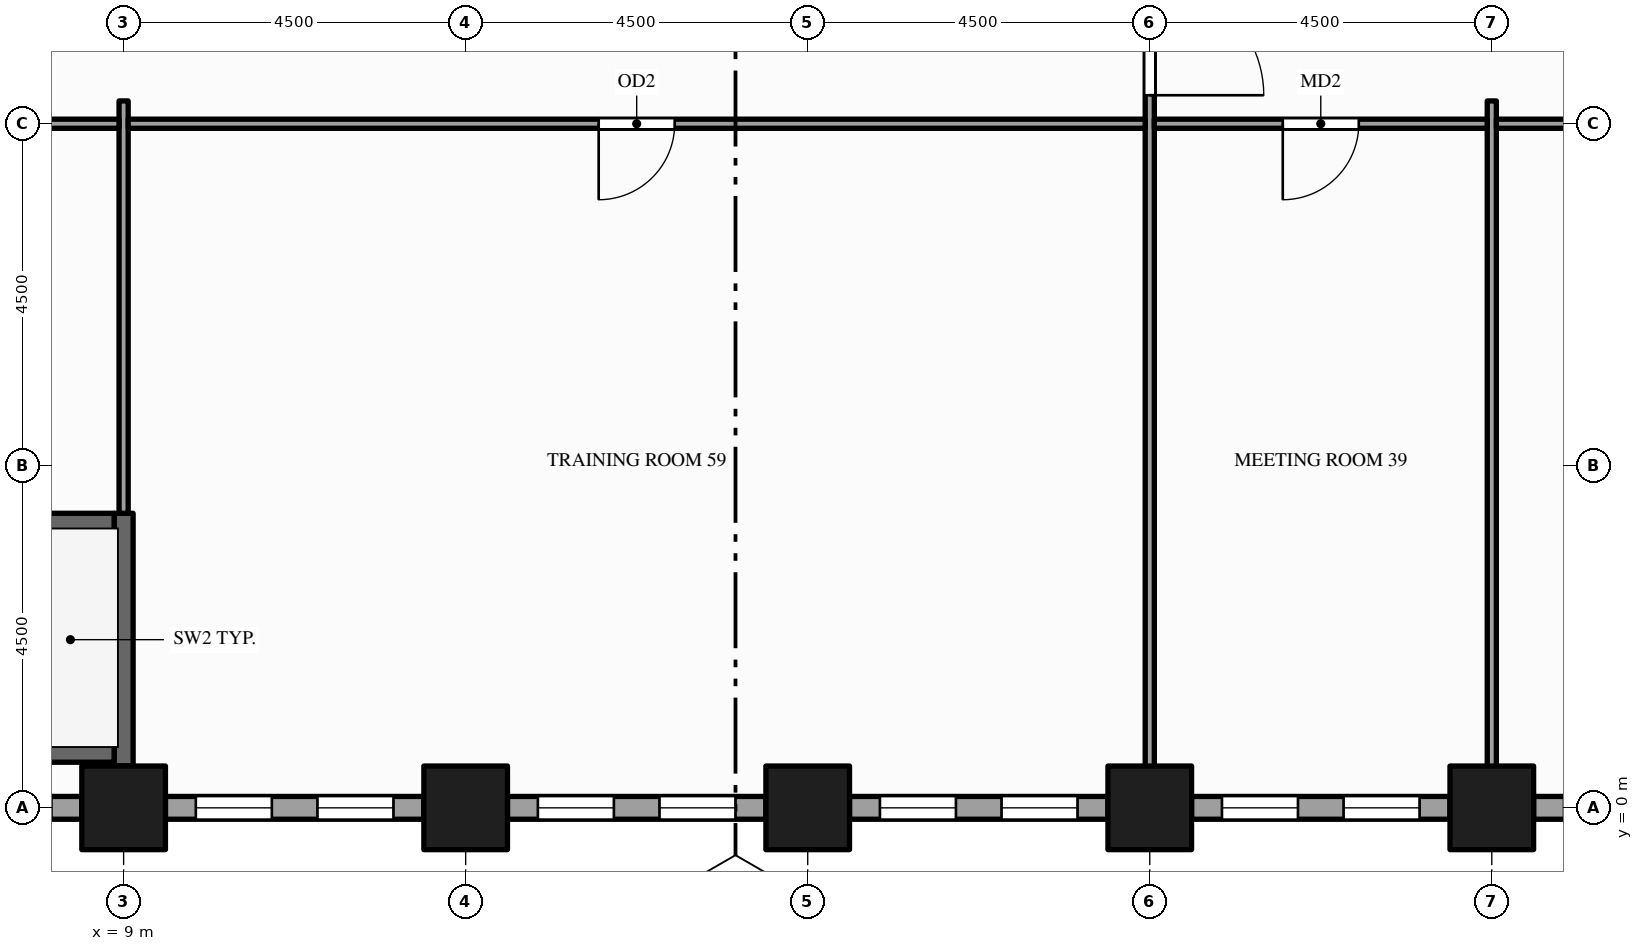
"""IFC4 building model, lengths in metres.
Left out: names, types, materials, properties, quantities, classifications, styles, units other than length and angle.
Written with IfcOpenShell. Run it as: python <this file> out.ifc"""

import sys

from ifc_helpers import new_model, si_unit, direction, frame, frame_2d, origin, origin_2d, place, context, subcontext, project, spatial, rectangle, hollow_rectangle, extrude, element, fill, save


model = new_model("IFC4")
c1 = context("Model", 3, precision=1e-05, world=origin(), true_north=direction((0.0, 1.0)))
c2 = subcontext(c1, "Body", "Model", "MODEL_VIEW")
j1 = project(units=[si_unit("LENGTHUNIT", "METRE"), si_unit("PLANEANGLEUNIT", "RADIAN")], contexts=[c1])
p1 = place(None, origin())
s1 = spatial("IfcSite", under=j1, at=p1, CompositionType="ELEMENT")
p2 = place(p1, origin())
s2 = spatial("IfcBuilding", under=s1, at=p2, CompositionType="ELEMENT")
p3 = place(p2, frame((0.0, 0.0, 14.0)))
s3 = spatial("IfcBuildingStorey", under=s2, at=p3, CompositionType="ELEMENT", Elevation=14.0)
for number, where, z_axis, x_axis in (
    (1, (9.0, 0.0, -0.25), (0.0, 0.0, 1.0), (1.0, 0.0, 0.0)),
    (2, (13.5, 0.0, -0.25), (0.0, 0.0, 1.0), (1.0, 0.0, 0.0)),
    (3, (18.0, 0.0, -0.25), (0.0, 0.0, 1.0), (1.0, 0.0, 0.0)),
    (4, (22.5, 0.0, -0.25), (0.0, 0.0, 1.0), (1.0, 0.0, 0.0)),
    (5, (27.0, 0.0, -0.25), (0.0, 0.0, 1.0), (1.0, 0.0, 0.0)),
):
    element("IfcColumn", number, at=place(p3, frame(where, z_axis=z_axis, x_axis=x_axis)), inside=s3, PredefinedType="COLUMN", context=c2, shape_type="SweptSolid", body=[
        extrude(hollow_rectangle(XDim=1.1, YDim=1.1, WallThickness=0.06, at=origin_2d()), origin(), (0.0, 0.0, 1.0), 5.0),
    ])
p4 = place(p3, frame((5.05, 0.0, 0.0), z_axis=(0.0, 0.0, 1.0), x_axis=(1.0, 0.0, 0.0)))
e6 = element("IfcWall", 6, at=p4, inside=s3, PredefinedType="STANDARD", context=c2, shape_type="SweptSolid", body=[
    extrude(rectangle(XDim=3.4, YDim=0.3, at=frame_2d((1.7, 0.0))), origin(), (0.0, 0.0, 1.0), 4.036),
])
p5 = place(p4, frame((0.4, 0.0, 0.9)))
e7 = element("IfcOpeningElement", 7, at=p5, cuts=e6, PredefinedType="OPENING", context=c2, shape_type="SweptSolid", body=[
    extrude(rectangle(XDim=1.0, YDim=2.75, at=frame_2d((0.5, 1.375))), frame((0.0, 0.16, 0.0), z_axis=(0.0, -1.0, 0.0), x_axis=(1.0, 0.0, 0.0)), (0.0, 0.0, 1.0), 0.32),
])
p6 = place(p4, frame((2.0, 0.0, 0.9)))
e8 = element("IfcOpeningElement", 8, at=p6, cuts=e6, PredefinedType="OPENING", context=c2, shape_type="SweptSolid", body=[
    extrude(rectangle(XDim=1.0, YDim=2.75, at=frame_2d((0.5, 1.375))), frame((0.0, 0.16, 0.0), z_axis=(0.0, -1.0, 0.0), x_axis=(1.0, 0.0, 0.0)), (0.0, 0.0, 1.0), 0.32),
])
p7 = place(p3, frame((9.55, 0.0, 0.0), z_axis=(0.0, 0.0, 1.0), x_axis=(1.0, 0.0, 0.0)))
e9 = element("IfcWall", 9, at=p7, inside=s3, PredefinedType="STANDARD", context=c2, shape_type="SweptSolid", body=[
    extrude(rectangle(XDim=3.4, YDim=0.3, at=frame_2d((1.7, 0.0))), origin(), (0.0, 0.0, 1.0), 4.036),
])
p8 = place(p7, frame((0.4, 0.0, 0.9)))
e10 = element("IfcOpeningElement", 10, at=p8, cuts=e9, PredefinedType="OPENING", context=c2, shape_type="SweptSolid", body=[
    extrude(rectangle(XDim=1.0, YDim=2.75, at=frame_2d((0.5, 1.375))), frame((0.0, 0.16, 0.0), z_axis=(0.0, -1.0, 0.0), x_axis=(1.0, 0.0, 0.0)), (0.0, 0.0, 1.0), 0.32),
])
p9 = place(p7, frame((2.0, 0.0, 0.9)))
e11 = element("IfcOpeningElement", 11, at=p9, cuts=e9, PredefinedType="OPENING", context=c2, shape_type="SweptSolid", body=[
    extrude(rectangle(XDim=1.0, YDim=2.75, at=frame_2d((0.5, 1.375))), frame((0.0, 0.16, 0.0), z_axis=(0.0, -1.0, 0.0), x_axis=(1.0, 0.0, 0.0)), (0.0, 0.0, 1.0), 0.32),
])
p10 = place(p3, frame((14.05, 0.0, 0.0), z_axis=(0.0, 0.0, 1.0), x_axis=(1.0, 0.0, 0.0)))
e12 = element("IfcWall", 12, at=p10, inside=s3, PredefinedType="STANDARD", context=c2, shape_type="SweptSolid", body=[
    extrude(rectangle(XDim=3.4, YDim=0.3, at=frame_2d((1.7, 0.0))), origin(), (0.0, 0.0, 1.0), 4.036),
])
p11 = place(p10, frame((0.4, 0.0, 0.9)))
e13 = element("IfcOpeningElement", 13, at=p11, cuts=e12, PredefinedType="OPENING", context=c2, shape_type="SweptSolid", body=[
    extrude(rectangle(XDim=1.0, YDim=2.75, at=frame_2d((0.5, 1.375))), frame((0.0, 0.16, 0.0), z_axis=(0.0, -1.0, 0.0), x_axis=(1.0, 0.0, 0.0)), (0.0, 0.0, 1.0), 0.32),
])
p12 = place(p10, frame((2.0, 0.0, 0.9)))
e14 = element("IfcOpeningElement", 14, at=p12, cuts=e12, PredefinedType="OPENING", context=c2, shape_type="SweptSolid", body=[
    extrude(rectangle(XDim=1.0, YDim=2.75, at=frame_2d((0.5, 1.375))), frame((0.0, 0.16, 0.0), z_axis=(0.0, -1.0, 0.0), x_axis=(1.0, 0.0, 0.0)), (0.0, 0.0, 1.0), 0.32),
])
p13 = place(p3, frame((18.55, 0.0, 0.0), z_axis=(0.0, 0.0, 1.0), x_axis=(1.0, 0.0, 0.0)))
e15 = element("IfcWall", 15, at=p13, inside=s3, PredefinedType="STANDARD", context=c2, shape_type="SweptSolid", body=[
    extrude(rectangle(XDim=3.4, YDim=0.3, at=frame_2d((1.7, 0.0))), origin(), (0.0, 0.0, 1.0), 4.036),
])
p14 = place(p13, frame((0.4, 0.0, 0.9)))
e16 = element("IfcOpeningElement", 16, at=p14, cuts=e15, PredefinedType="OPENING", context=c2, shape_type="SweptSolid", body=[
    extrude(rectangle(XDim=1.0, YDim=2.75, at=frame_2d((0.5, 1.375))), frame((0.0, 0.16, 0.0), z_axis=(0.0, -1.0, 0.0), x_axis=(1.0, 0.0, 0.0)), (0.0, 0.0, 1.0), 0.32),
])
p15 = place(p13, frame((2.0, 0.0, 0.9)))
e17 = element("IfcOpeningElement", 17, at=p15, cuts=e15, PredefinedType="OPENING", context=c2, shape_type="SweptSolid", body=[
    extrude(rectangle(XDim=1.0, YDim=2.75, at=frame_2d((0.5, 1.375))), frame((0.0, 0.16, 0.0), z_axis=(0.0, -1.0, 0.0), x_axis=(1.0, 0.0, 0.0)), (0.0, 0.0, 1.0), 0.32),
])
p16 = place(p3, frame((23.05, 0.0, 0.0), z_axis=(0.0, 0.0, 1.0), x_axis=(1.0, 0.0, 0.0)))
e18 = element("IfcWall", 18, at=p16, inside=s3, PredefinedType="STANDARD", context=c2, shape_type="SweptSolid", body=[
    extrude(rectangle(XDim=3.4, YDim=0.3, at=frame_2d((1.7, 0.0))), origin(), (0.0, 0.0, 1.0), 4.036),
])
p17 = place(p16, frame((0.4, 0.0, 0.9)))
e19 = element("IfcOpeningElement", 19, at=p17, cuts=e18, PredefinedType="OPENING", context=c2, shape_type="SweptSolid", body=[
    extrude(rectangle(XDim=1.0, YDim=2.75, at=frame_2d((0.5, 1.375))), frame((0.0, 0.16, 0.0), z_axis=(0.0, -1.0, 0.0), x_axis=(1.0, 0.0, 0.0)), (0.0, 0.0, 1.0), 0.32),
])
p18 = place(p16, frame((2.0, 0.0, 0.9)))
e20 = element("IfcOpeningElement", 20, at=p18, cuts=e18, PredefinedType="OPENING", context=c2, shape_type="SweptSolid", body=[
    extrude(rectangle(XDim=1.0, YDim=2.75, at=frame_2d((0.5, 1.375))), frame((0.0, 0.16, 0.0), z_axis=(0.0, -1.0, 0.0), x_axis=(1.0, 0.0, 0.0)), (0.0, 0.0, 1.0), 0.32),
])
p19 = place(p3, frame((27.55, 0.0, 0.0), z_axis=(0.0, 0.0, 1.0), x_axis=(1.0, 0.0, 0.0)))
e21 = element("IfcWall", 21, at=p19, inside=s3, PredefinedType="STANDARD", context=c2, shape_type="SweptSolid", body=[
    extrude(rectangle(XDim=3.4, YDim=0.3, at=frame_2d((1.7, 0.0))), origin(), (0.0, 0.0, 1.0), 4.036),
])
p20 = place(p19, frame((0.4, 0.0, 0.9)))
e22 = element("IfcOpeningElement", 22, at=p20, cuts=e21, PredefinedType="OPENING", context=c2, shape_type="SweptSolid", body=[
    extrude(rectangle(XDim=1.0, YDim=2.75, at=frame_2d((0.5, 1.375))), frame((0.0, 0.16, 0.0), z_axis=(0.0, -1.0, 0.0), x_axis=(1.0, 0.0, 0.0)), (0.0, 0.0, 1.0), 0.32),
])
p21 = place(p19, frame((2.0, 0.0, 0.9)))
e23 = element("IfcOpeningElement", 23, at=p21, cuts=e21, PredefinedType="OPENING", context=c2, shape_type="SweptSolid", body=[
    extrude(rectangle(XDim=1.0, YDim=2.75, at=frame_2d((0.5, 1.375))), frame((0.0, 0.16, 0.0), z_axis=(0.0, -1.0, 0.0), x_axis=(1.0, 0.0, 0.0)), (0.0, 0.0, 1.0), 0.32),
])
p22 = place(p3, frame((9.0, 0.15, 0.0), z_axis=(0.0, 0.0, 1.0), x_axis=(0.0, 1.0, 0.0)))
e24 = element("IfcWall", 24, at=p22, inside=s3, PredefinedType="PARTITIONING", context=c2, shape_type="SweptSolid", body=[
    extrude(rectangle(XDim=0.4, YDim=0.12, at=frame_2d((0.2, 0.0))), origin(), (0.0, 0.0, 1.0), 4.75),
])
p23 = place(p3, frame((9.0, 0.55, 0.0), z_axis=(0.0, 0.0, 1.0), x_axis=(0.0, 1.0, 0.0)))
e25 = element("IfcWall", 25, at=p23, inside=s3, PredefinedType="SHEAR", context=c2, shape_type="SweptSolid", body=[
    extrude(rectangle(XDim=3.325, YDim=0.25, at=frame_2d((1.663, 0.0))), origin(), (0.0, 0.0, 1.0), 4.75),
])
p24 = place(p3, frame((9.0, 3.875, 0.0), z_axis=(0.0, 0.0, 1.0), x_axis=(0.0, 1.0, 0.0)))
e26 = element("IfcWall", 26, at=p24, inside=s3, PredefinedType="PARTITIONING", context=c2, shape_type="SweptSolid", body=[
    extrude(rectangle(XDim=5.425, YDim=0.12, at=frame_2d((2.712, 0.0))), origin(), (0.0, 0.0, 1.0), 3.759),
])
p25 = place(p3, frame((22.5, 0.15, 0.0), z_axis=(0.0, 0.0, 1.0), x_axis=(0.0, 1.0, 0.0)))
e27 = element("IfcWall", 27, at=p25, inside=s3, PredefinedType="PARTITIONING", context=c2, shape_type="SweptSolid", body=[
    extrude(rectangle(XDim=35.95, YDim=0.12, at=frame_2d((17.975, 0.0))), origin(), (0.0, 0.0, 1.0), 3.759),
])
p26 = place(p25, frame((9.225, 0.0, 0.0)))
e28 = element("IfcOpeningElement", 28, at=p26, cuts=e27, PredefinedType="OPENING", context=c2, shape_type="SweptSolid", body=[
    extrude(rectangle(XDim=1.5, YDim=2.1, at=frame_2d((0.75, 1.05))), frame((0.0, 0.07, 0.0), z_axis=(0.0, -1.0, 0.0), x_axis=(1.0, 0.0, 0.0)), (0.0, 0.0, 1.0), 0.14),
])
p27 = place(p25, frame((32.7, 0.0, 0.0)))
e29 = element("IfcOpeningElement", 29, at=p27, cuts=e27, PredefinedType="OPENING", context=c2, shape_type="SweptSolid", body=[
    extrude(rectangle(XDim=1.8, YDim=2.1, at=frame_2d((0.9, 1.05))), frame((0.0, 0.07, 0.0), z_axis=(0.0, -1.0, 0.0), x_axis=(1.0, 0.0, 0.0)), (0.0, 0.0, 1.0), 0.14),
])
p28 = place(p3, frame((27.0, 0.15, 0.0), z_axis=(0.0, 0.0, 1.0), x_axis=(0.0, 1.0, 0.0)))
e30 = element("IfcWall", 30, at=p28, inside=s3, PredefinedType="PARTITIONING", context=c2, shape_type="SweptSolid", body=[
    extrude(rectangle(XDim=9.15, YDim=0.12, at=frame_2d((4.575, 0.0))), origin(), (0.0, 0.0, 1.0), 3.759),
])
p29 = place(p3, frame((0.85, 0.725, 0.0), z_axis=(0.0, 0.0, 1.0), x_axis=(1.0, 0.0, 0.0)))
e31 = element("IfcWall", 31, at=p29, inside=s3, PredefinedType="SHEAR", context=c2, shape_type="SweptSolid", body=[
    extrude(rectangle(XDim=8.025, YDim=0.25, at=frame_2d((4.012, 0.0))), origin(), (0.0, 0.0, 1.0), 4.75),
])
p30 = place(p3, frame((0.85, 3.75, 0.0), z_axis=(0.0, 0.0, 1.0), x_axis=(1.0, 0.0, 0.0)))
e32 = element("IfcWall", 32, at=p30, inside=s3, PredefinedType="SHEAR", context=c2, shape_type="SweptSolid", body=[
    extrude(rectangle(XDim=8.025, YDim=0.25, at=frame_2d((4.012, 0.0))), origin(), (0.0, 0.0, 1.0), 4.75),
])
p31 = place(p30, frame((0.15, 0.0, 0.0)))
e33 = element("IfcOpeningElement", 33, at=p31, cuts=e32, PredefinedType="OPENING", context=c2, shape_type="SweptSolid", body=[
    extrude(rectangle(XDim=1.1, YDim=2.1, at=frame_2d((0.55, 1.05))), frame((0.0, 0.135, 0.0), z_axis=(0.0, -1.0, 0.0), x_axis=(1.0, 0.0, 0.0)), (0.0, 0.0, 1.0), 0.27),
])
p32 = place(p3, frame((0.15, 9.0, 0.0), z_axis=(0.0, 0.0, 1.0), x_axis=(1.0, 0.0, 0.0)))
e34 = element("IfcWall", 34, at=p32, inside=s3, PredefinedType="PARTITIONING", context=c2, shape_type="SweptSolid", body=[
    extrude(rectangle(XDim=8.79, YDim=0.12, at=frame_2d((4.395, 0.0))), origin(), (0.0, 0.0, 1.0), 3.759),
])
p33 = place(p32, frame((3.805, 0.0, 0.0)))
e35 = element("IfcOpeningElement", 35, at=p33, cuts=e34, PredefinedType="OPENING", context=c2, shape_type="SweptSolid", body=[
    extrude(rectangle(XDim=1.2, YDim=2.1, at=frame_2d((0.6, 1.05))), frame((0.0, 0.07, 0.0), z_axis=(0.0, -1.0, 0.0), x_axis=(1.0, 0.0, 0.0)), (0.0, 0.0, 1.0), 0.14),
])
p34 = place(p3, frame((9.06, 9.0, 0.0), z_axis=(0.0, 0.0, 1.0), x_axis=(1.0, 0.0, 0.0)))
e36 = element("IfcWall", 36, at=p34, inside=s3, PredefinedType="PARTITIONING", context=c2, shape_type="SweptSolid", body=[
    extrude(rectangle(XDim=13.38, YDim=0.12, at=frame_2d((6.69, 0.0))), origin(), (0.0, 0.0, 1.0), 3.759),
])
p35 = place(p34, frame((6.19, 0.0, 0.0)))
e37 = element("IfcOpeningElement", 37, at=p35, cuts=e36, PredefinedType="OPENING", context=c2, shape_type="SweptSolid", body=[
    extrude(rectangle(XDim=1.0, YDim=2.1, at=frame_2d((0.5, 1.05))), frame((0.0, 0.07, 0.0), z_axis=(0.0, -1.0, 0.0), x_axis=(1.0, 0.0, 0.0)), (0.0, 0.0, 1.0), 0.14),
])
p36 = place(p3, frame((22.56, 9.0, 0.0), z_axis=(0.0, 0.0, 1.0), x_axis=(1.0, 0.0, 0.0)))
e38 = element("IfcWall", 38, at=p36, inside=s3, PredefinedType="PARTITIONING", context=c2, shape_type="SweptSolid", body=[
    extrude(rectangle(XDim=4.38, YDim=0.12, at=frame_2d((2.19, 0.0))), origin(), (0.0, 0.0, 1.0), 3.66),
])
p37 = place(p36, frame((1.69, 0.0, 0.0)))
e39 = element("IfcOpeningElement", 39, at=p37, cuts=e38, PredefinedType="OPENING", context=c2, shape_type="SweptSolid", body=[
    extrude(rectangle(XDim=1.0, YDim=2.1, at=frame_2d((0.5, 1.05))), frame((0.0, 0.07, 0.0), z_axis=(0.0, -1.0, 0.0), x_axis=(1.0, 0.0, 0.0)), (0.0, 0.0, 1.0), 0.14),
])
p38 = place(p3, frame((27.06, 9.0, 0.0), z_axis=(0.0, 0.0, 1.0), x_axis=(1.0, 0.0, 0.0)))
e40 = element("IfcWall", 40, at=p38, inside=s3, PredefinedType="PARTITIONING", context=c2, shape_type="SweptSolid", body=[
    extrude(rectangle(XDim=8.88, YDim=0.12, at=frame_2d((4.44, 0.0))), origin(), (0.0, 0.0, 1.0), 3.66),
])
p39 = place(p38, frame((3.84, 0.0, 0.0)))
e41 = element("IfcOpeningElement", 41, at=p39, cuts=e40, PredefinedType="OPENING", context=c2, shape_type="SweptSolid", body=[
    extrude(rectangle(XDim=1.2, YDim=2.1, at=frame_2d((0.6, 1.05))), frame((0.0, 0.07, 0.0), z_axis=(0.0, -1.0, 0.0), x_axis=(1.0, 0.0, 0.0)), (0.0, 0.0, 1.0), 0.14),
])
p40 = place(p8, origin())
e42 = element("IfcWindow", 42, at=p40, inside=s3, PartitioningType="SINGLE_PANEL", PredefinedType="WINDOW", context=c2, shape_type="SweptSolid", body=[
    extrude(rectangle(XDim=1.0, YDim=2.75, at=frame_2d((0.5, 1.375))), frame((0.0, 0.03, 0.0), z_axis=(0.0, -1.0, 0.0), x_axis=(1.0, 0.0, 0.0)), (0.0, 0.0, 1.0), 0.06),
])
fill(e10, e42)
p41 = place(p9, origin())
e43 = element("IfcWindow", 43, at=p41, inside=s3, PartitioningType="SINGLE_PANEL", PredefinedType="WINDOW", context=c2, shape_type="SweptSolid", body=[
    extrude(rectangle(XDim=1.0, YDim=2.75, at=frame_2d((0.5, 1.375))), frame((0.0, 0.03, 0.0), z_axis=(0.0, -1.0, 0.0), x_axis=(1.0, 0.0, 0.0)), (0.0, 0.0, 1.0), 0.06),
])
fill(e11, e43)
p42 = place(p11, origin())
e44 = element("IfcWindow", 44, at=p42, inside=s3, PartitioningType="SINGLE_PANEL", PredefinedType="WINDOW", context=c2, shape_type="SweptSolid", body=[
    extrude(rectangle(XDim=1.0, YDim=2.75, at=frame_2d((0.5, 1.375))), frame((0.0, 0.03, 0.0), z_axis=(0.0, -1.0, 0.0), x_axis=(1.0, 0.0, 0.0)), (0.0, 0.0, 1.0), 0.06),
])
fill(e13, e44)
p43 = place(p12, origin())
e45 = element("IfcWindow", 45, at=p43, inside=s3, PartitioningType="SINGLE_PANEL", PredefinedType="WINDOW", context=c2, shape_type="SweptSolid", body=[
    extrude(rectangle(XDim=1.0, YDim=2.75, at=frame_2d((0.5, 1.375))), frame((0.0, 0.03, 0.0), z_axis=(0.0, -1.0, 0.0), x_axis=(1.0, 0.0, 0.0)), (0.0, 0.0, 1.0), 0.06),
])
fill(e14, e45)
p44 = place(p14, origin())
e46 = element("IfcWindow", 46, at=p44, inside=s3, PartitioningType="SINGLE_PANEL", PredefinedType="WINDOW", context=c2, shape_type="SweptSolid", body=[
    extrude(rectangle(XDim=1.0, YDim=2.75, at=frame_2d((0.5, 1.375))), frame((0.0, 0.03, 0.0), z_axis=(0.0, -1.0, 0.0), x_axis=(1.0, 0.0, 0.0)), (0.0, 0.0, 1.0), 0.06),
])
fill(e16, e46)
p45 = place(p15, origin())
e47 = element("IfcWindow", 47, at=p45, inside=s3, PartitioningType="SINGLE_PANEL", PredefinedType="WINDOW", context=c2, shape_type="SweptSolid", body=[
    extrude(rectangle(XDim=1.0, YDim=2.75, at=frame_2d((0.5, 1.375))), frame((0.0, 0.03, 0.0), z_axis=(0.0, -1.0, 0.0), x_axis=(1.0, 0.0, 0.0)), (0.0, 0.0, 1.0), 0.06),
])
fill(e17, e47)
p46 = place(p17, origin())
e48 = element("IfcWindow", 48, at=p46, inside=s3, PartitioningType="SINGLE_PANEL", PredefinedType="WINDOW", context=c2, shape_type="SweptSolid", body=[
    extrude(rectangle(XDim=1.0, YDim=2.75, at=frame_2d((0.5, 1.375))), frame((0.0, 0.03, 0.0), z_axis=(0.0, -1.0, 0.0), x_axis=(1.0, 0.0, 0.0)), (0.0, 0.0, 1.0), 0.06),
])
fill(e19, e48)
p47 = place(p18, origin())
e49 = element("IfcWindow", 49, at=p47, inside=s3, PartitioningType="SINGLE_PANEL", PredefinedType="WINDOW", context=c2, shape_type="SweptSolid", body=[
    extrude(rectangle(XDim=1.0, YDim=2.75, at=frame_2d((0.5, 1.375))), frame((0.0, 0.03, 0.0), z_axis=(0.0, -1.0, 0.0), x_axis=(1.0, 0.0, 0.0)), (0.0, 0.0, 1.0), 0.06),
])
fill(e20, e49)
p48 = place(p37, origin())
e50 = element("IfcDoor", 50, at=p48, inside=s3, OperationType="SINGLE_SWING_LEFT", PredefinedType="DOOR", context=c2, shape_type="SweptSolid", body=[
    extrude(rectangle(XDim=1.0, YDim=2.1, at=frame_2d((0.5, 1.05))), frame((0.0, 0.025, 0.0), z_axis=(0.0, -1.0, 0.0), x_axis=(1.0, 0.0, 0.0)), (0.0, 0.0, 1.0), 0.05),
])
fill(e39, e50)
p49 = place(p26, origin())
e51 = element("IfcDoor", 51, at=p49, inside=s3, OperationType="SINGLE_SWING_LEFT", PredefinedType="DOOR", context=c2, shape_type="SweptSolid", body=[
    extrude(rectangle(XDim=1.5, YDim=2.1, at=frame_2d((0.75, 1.05))), frame((0.0, 0.025, 0.0), z_axis=(0.0, -1.0, 0.0), x_axis=(1.0, 0.0, 0.0)), (0.0, 0.0, 1.0), 0.05),
])
fill(e28, e51)
p50 = place(p35, origin())
e52 = element("IfcDoor", 52, at=p50, inside=s3, OperationType="SINGLE_SWING_LEFT", PredefinedType="DOOR", context=c2, shape_type="SweptSolid", body=[
    extrude(rectangle(XDim=1.0, YDim=2.1, at=frame_2d((0.5, 1.05))), frame((0.0, 0.025, 0.0), z_axis=(0.0, -1.0, 0.0), x_axis=(1.0, 0.0, 0.0)), (0.0, 0.0, 1.0), 0.05),
])
fill(e37, e52)
save(model, sys.argv[1])
